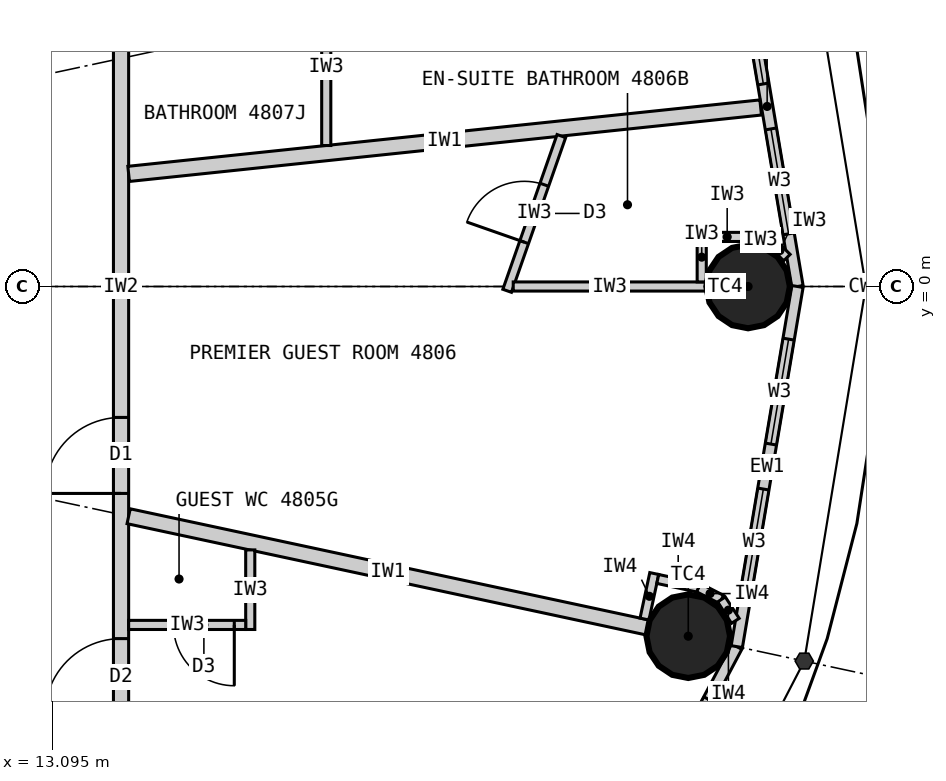
"""IFC4 building model, lengths in metres.
Left out: names, types, materials, properties, quantities, classifications, styles, units other than length and angle.
Written with IfcOpenShell. Run it as: python <this file> out.ifc"""

import sys

from ifc_helpers import new_model, si_unit, direction, frame, frame_2d, origin, origin_2d, place, context, subcontext, project, spatial, rectangle, circle, extrude, element, fill, save


model = new_model("IFC4")
c1 = context("Model", 3, precision=1e-05, world=origin(), true_north=direction((0.0, 1.0)))
c2 = subcontext(c1, "Body", "Model", "MODEL_VIEW")
j1 = project(units=[si_unit("LENGTHUNIT", "METRE"), si_unit("PLANEANGLEUNIT", "RADIAN")], contexts=[c1])
p1 = place(None, origin())
s1 = spatial("IfcSite", under=j1, at=p1, CompositionType="ELEMENT")
p2 = place(p1, origin())
s2 = spatial("IfcBuilding", under=s1, at=p2, CompositionType="ELEMENT")
p3 = place(p2, frame((0.0, 0.0, 179.7)))
s3 = spatial("IfcBuildingStorey", under=s2, at=p3, CompositionType="ELEMENT", Elevation=179.7)
for number, where, z_axis, x_axis in (
    (1, (22.25, 0.0, 0.0), (0.0, 0.0, 1.0), (1.0, 0.0, 0.0)),
    (2, (21.463, -4.601, 0.0), (0.0, 0.0, 1.0), (1.0, 0.0, 0.0)),
):
    element("IfcColumn", number, at=place(p3, frame(where, z_axis=z_axis, x_axis=x_axis)), inside=s3, PredefinedType="COLUMN", context=c2, shape_type="SweptSolid", body=[
        extrude(circle(Radius=0.55, at=origin_2d()), origin(), (0.0, 0.0, 1.0), 3.3),
    ])
p4 = place(p3, frame((22.9, 0.0, 0.0), z_axis=(0.0, 0.0, 1.0), x_axis=(-0.166162111254, 0.986098449843, 0.0)))
e3 = element("IfcWall", 3, at=p4, inside=s3, PredefinedType="ELEMENTEDWALL", context=c2, shape_type="SweptSolid", body=[
    extrude(rectangle(XDim=4.805, YDim=0.15, at=frame_2d((2.402, 0.0))), origin(), (0.0, 0.0, 1.0), 3.12),
])
p5 = place(p4, frame((0.702, 0.0, 0.9)))
e4 = element("IfcOpeningElement", 4, at=p5, cuts=e3, PredefinedType="OPENING", context=c2, shape_type="SweptSolid", body=[
    extrude(rectangle(XDim=1.4, YDim=1.9, at=frame_2d((0.7, 0.95))), frame((0.0, 0.085, 0.0), z_axis=(0.0, -1.0, 0.0), x_axis=(1.0, 0.0, 0.0)), (0.0, 0.0, 1.0), 0.17),
])
p6 = place(p4, frame((2.702, 0.0, 0.9)))
e5 = element("IfcOpeningElement", 5, at=p6, cuts=e3, PredefinedType="OPENING", context=c2, shape_type="SweptSolid", body=[
    extrude(rectangle(XDim=1.4, YDim=1.9, at=frame_2d((0.7, 0.95))), frame((0.0, 0.085, 0.0), z_axis=(0.0, -1.0, 0.0), x_axis=(1.0, 0.0, 0.0)), (0.0, 0.0, 1.0), 0.17),
])
p7 = place(p3, frame((19.772, -9.132, 0.0), z_axis=(0.0, 0.0, 1.0), x_axis=(0.468428906714, 0.883501193748, 0.0)))
e6 = element("IfcWall", 6, at=p7, inside=s3, PredefinedType="ELEMENTEDWALL", context=c2, shape_type="SweptSolid", body=[
    extrude(rectangle(XDim=4.974, YDim=0.15, at=frame_2d((2.487, 0.0))), origin(), (0.0, 0.0, 1.0), 3.12),
])
p8 = place(p7, frame((0.787, 0.0, 0.9)))
e7 = element("IfcOpeningElement", 7, at=p8, cuts=e6, PredefinedType="OPENING", context=c2, shape_type="SweptSolid", body=[
    extrude(rectangle(XDim=1.4, YDim=1.9, at=frame_2d((0.7, 0.95))), frame((0.0, 0.085, 0.0), z_axis=(0.0, -1.0, 0.0), x_axis=(1.0, 0.0, 0.0)), (0.0, 0.0, 1.0), 0.17),
])
p9 = place(p7, frame((2.787, 0.0, 0.9)))
e8 = element("IfcOpeningElement", 8, at=p9, cuts=e6, PredefinedType="OPENING", context=c2, shape_type="SweptSolid", body=[
    extrude(rectangle(XDim=1.4, YDim=1.9, at=frame_2d((0.7, 0.95))), frame((0.0, 0.085, 0.0), z_axis=(0.0, -1.0, 0.0), x_axis=(1.0, 0.0, 0.0)), (0.0, 0.0, 1.0), 0.17),
])
p10 = place(p3, frame((22.102, -4.738, 0.0), z_axis=(0.0, 0.0, 1.0), x_axis=(0.166162111254, 0.986098449843, 0.0)))
e9 = element("IfcWall", 9, at=p10, inside=s3, PredefinedType="ELEMENTEDWALL", context=c2, shape_type="SweptSolid", body=[
    extrude(rectangle(XDim=4.805, YDim=0.15, at=frame_2d((2.402, 0.0))), origin(), (0.0, 0.0, 1.0), 3.12),
])
p11 = place(p10, frame((0.702, 0.0, 0.9)))
e10 = element("IfcOpeningElement", 10, at=p11, cuts=e9, PredefinedType="OPENING", context=c2, shape_type="SweptSolid", body=[
    extrude(rectangle(XDim=1.4, YDim=1.9, at=frame_2d((0.7, 0.95))), frame((0.0, 0.085, 0.0), z_axis=(0.0, -1.0, 0.0), x_axis=(1.0, 0.0, 0.0)), (0.0, 0.0, 1.0), 0.17),
])
p12 = place(p10, frame((2.702, 0.0, 0.9)))
e11 = element("IfcOpeningElement", 11, at=p12, cuts=e9, PredefinedType="OPENING", context=c2, shape_type="SweptSolid", body=[
    extrude(rectangle(XDim=1.4, YDim=1.9, at=frame_2d((0.7, 0.95))), frame((0.0, 0.085, 0.0), z_axis=(0.0, -1.0, 0.0), x_axis=(1.0, 0.0, 0.0)), (0.0, 0.0, 1.0), 0.17),
])
p13 = place(p3, frame((14.0, -9.9, 0.0), z_axis=(0.0, 0.0, 1.0), x_axis=(0.0, 1.0, 0.0)))
e12 = element("IfcWall", 12, at=p13, inside=s3, PredefinedType="PARTITIONING", context=c2, shape_type="SweptSolid", body=[
    extrude(rectangle(XDim=19.8, YDim=0.2, at=frame_2d((9.9, 0.0))), origin(), (0.0, 0.0, 1.0), 3.12),
])
p14 = place(p13, frame((4.268, 0.0, 0.0)))
e13 = element("IfcOpeningElement", 13, at=p14, cuts=e12, PredefinedType="OPENING", context=c2, shape_type="SweptSolid", body=[
    extrude(rectangle(XDim=1.0, YDim=2.2, at=frame_2d((0.5, 1.1))), frame((0.0, 0.11, 0.0), z_axis=(0.0, -1.0, 0.0), x_axis=(1.0, 0.0, 0.0)), (0.0, 0.0, 1.0), 0.22),
])
p15 = place(p13, frame((7.177, 0.0, 0.0)))
e14 = element("IfcOpeningElement", 14, at=p15, cuts=e12, PredefinedType="OPENING", context=c2, shape_type="SweptSolid", body=[
    extrude(rectangle(XDim=1.0, YDim=2.2, at=frame_2d((0.5, 1.1))), frame((0.0, 0.11, 0.0), z_axis=(0.0, -1.0, 0.0), x_axis=(1.0, 0.0, 0.0)), (0.0, 0.0, 1.0), 0.22),
])
p16 = place(p13, frame((17.701, 0.0, 0.0)))
e15 = element("IfcOpeningElement", 15, at=p16, cuts=e12, PredefinedType="OPENING", context=c2, shape_type="SweptSolid", body=[
    extrude(rectangle(XDim=1.0, YDim=2.2, at=frame_2d((0.5, 1.1))), frame((0.0, 0.11, 0.0), z_axis=(0.0, -1.0, 0.0), x_axis=(1.0, 0.0, 0.0)), (0.0, 0.0, 1.0), 0.22),
])
p17 = place(p3, frame((14.1, 1.481, 0.0), z_axis=(0.0, 0.0, 1.0), x_axis=(0.994524794819, 0.104500873159, 0.0)))
e16 = element("IfcWall", 16, at=p17, inside=s3, PredefinedType="PARTITIONING", context=c2, shape_type="SweptSolid", body=[
    extrude(rectangle(XDim=8.362, YDim=0.2, at=frame_2d((4.181, 0.0))), origin(), (0.0, 0.0, 1.0), 2.37),
])
p18 = place(p3, frame((14.1, -3.022, 0.0), z_axis=(0.0, 0.0, 1.0), x_axis=(0.977790639684, -0.209584028367, 0.0)))
e17 = element("IfcWall", 17, at=p18, inside=s3, PredefinedType="PARTITIONING", context=c2, shape_type="SweptSolid", body=[
    extrude(rectangle(XDim=6.98, YDim=0.2, at=frame_2d((3.49, 0.0))), origin(), (0.0, 0.0, 1.0), 2.27),
])
p19 = place(p3, frame((15.7, -3.465, 0.0), z_axis=(0.0, 0.0, 1.0), x_axis=(0.0, -1.0, 0.0)))
e18 = element("IfcWall", 18, at=p19, inside=s3, PredefinedType="PARTITIONING", context=c2, shape_type="SweptSolid", body=[
    extrude(rectangle(XDim=1.047, YDim=0.12, at=frame_2d((0.523, 0.0))), origin(), (0.0, 0.0, 1.0), 3.12),
])
p20 = place(p3, frame((14.1, -4.452, 0.0), z_axis=(0.0, 0.0, 1.0), x_axis=(1.0, 0.0, 0.0)))
e19 = element("IfcWall", 19, at=p20, inside=s3, PredefinedType="PARTITIONING", context=c2, shape_type="SweptSolid", body=[
    extrude(rectangle(XDim=1.54, YDim=0.12, at=frame_2d((0.77, 0.0))), origin(), (0.0, 0.0, 1.0), 3.12),
])
p21 = place(p20, frame((0.59, 0.0, 0.0)))
e20 = element("IfcOpeningElement", 20, at=p21, cuts=e19, PredefinedType="OPENING", context=c2, shape_type="SweptSolid", body=[
    extrude(rectangle(XDim=0.8, YDim=2.1, at=frame_2d((0.4, 1.05))), frame((0.0, 0.07, 0.0), z_axis=(0.0, -1.0, 0.0), x_axis=(1.0, 0.0, 0.0)), (0.0, 0.0, 1.0), 0.14),
])
p22 = place(p3, frame((19.793, 1.979, 0.0), z_axis=(0.0, 0.0, 1.0), x_axis=(-0.330587353123, -0.943775398045, 0.0)))
e21 = element("IfcWall", 21, at=p22, inside=s3, PredefinedType="PARTITIONING", context=c2, shape_type="SweptSolid", body=[
    extrude(rectangle(XDim=2.157, YDim=0.12, at=frame_2d((1.079, 0.0))), origin(), (0.0, 0.0, 1.0), 3.12),
])
p23 = place(p22, frame((0.678, 0.0, 0.0)))
e22 = element("IfcOpeningElement", 22, at=p23, cuts=e21, PredefinedType="OPENING", context=c2, shape_type="SweptSolid", body=[
    extrude(rectangle(XDim=0.8, YDim=2.1, at=frame_2d((0.4, 1.05))), frame((0.0, 0.07, 0.0), z_axis=(0.0, -1.0, 0.0), x_axis=(1.0, 0.0, 0.0)), (0.0, 0.0, 1.0), 0.14),
])
p24 = place(p3, frame((19.16, 0.0, 0.0), z_axis=(0.0, 0.0, 1.0), x_axis=(1.0, 0.0, 0.0)))
e23 = element("IfcWall", 23, at=p24, inside=s3, PredefinedType="PARTITIONING", context=c2, shape_type="SweptSolid", body=[
    extrude(rectangle(XDim=2.54, YDim=0.12, at=frame_2d((1.27, 0.0))), origin(), (0.0, 0.0, 1.0), 2.27),
])
p25 = place(p3, frame((21.64, 0.06, 0.0), z_axis=(0.0, 0.0, 1.0), x_axis=(0.0, 1.0, 0.0)))
e24 = element("IfcWall", 24, at=p25, inside=s3, PredefinedType="PARTITIONING", context=c2, shape_type="SweptSolid", body=[
    extrude(rectangle(XDim=0.652, YDim=0.12, at=frame_2d((0.326, 0.0))), origin(), (0.0, 0.0, 1.0), 3.12),
])
p26 = place(p3, frame((21.7, 0.652, 0.0), z_axis=(0.0, 0.0, 1.0), x_axis=(1.0, 0.0, 0.0)))
e25 = element("IfcWall", 25, at=p26, inside=s3, PredefinedType="PARTITIONING", context=c2, shape_type="SweptSolid", body=[
    extrude(rectangle(XDim=0.55, YDim=0.12, at=frame_2d((0.275, 0.0))), origin(), (0.0, 0.0, 1.0), 3.12),
])
p27 = place(p3, frame((22.25, 0.652, 0.0), z_axis=(0.0, 0.0, 1.0), x_axis=(0.965922233104, -0.258832454679, 0.0)))
e26 = element("IfcWall", 26, at=p27, inside=s3, PredefinedType="PARTITIONING", context=c2, shape_type="SweptSolid", body=[
    extrude(rectangle(XDim=0.338, YDim=0.12, at=frame_2d((0.169, 0.0))), origin(), (0.0, 0.0, 1.0), 3.12),
])
p28 = place(p3, frame((22.576, 0.565, 0.0), z_axis=(0.0, 0.0, 1.0), x_axis=(0.706639272724, -0.707573980757, 0.0)))
e27 = element("IfcWall", 27, at=p28, inside=s3, PredefinedType="PARTITIONING", context=c2, shape_type="SweptSolid", body=[
    extrude(rectangle(XDim=0.261, YDim=0.12, at=frame_2d((0.131, 0.0))), origin(), (0.0, 0.0, 1.0), 3.12),
])
p29 = place(p3, frame((16.7, 1.855, 0.0), z_axis=(0.0, 0.0, 1.0), x_axis=(0.0, 1.0, 0.0)))
e28 = element("IfcWall", 28, at=p29, inside=s3, PredefinedType="PARTITIONING", context=c2, shape_type="SweptSolid", body=[
    extrude(rectangle(XDim=2.067, YDim=0.12, at=frame_2d((1.033, 0.0))), origin(), (0.0, 0.0, 1.0), 3.12),
])
p30 = place(p3, frame((20.887, -4.375, 0.0), z_axis=(0.0, 0.0, 1.0), x_axis=(0.209746941802, 0.977755705892, 0.0)))
e29 = element("IfcWall", 29, at=p30, inside=s3, PredefinedType="PARTITIONING", context=c2, shape_type="SweptSolid", body=[
    extrude(rectangle(XDim=0.612, YDim=0.12, at=frame_2d((0.306, 0.0))), origin(), (0.0, 0.0, 1.0), 3.12),
])
p31 = place(p3, frame((21.062, -3.848, 0.0), z_axis=(0.0, 0.0, 1.0), x_axis=(0.977789415726, -0.209589738521, 0.0)))
e30 = element("IfcWall", 30, at=p31, inside=s3, PredefinedType="PARTITIONING", context=c2, shape_type="SweptSolid", body=[
    extrude(rectangle(XDim=0.55, YDim=0.12, at=frame_2d((0.275, 0.0))), origin(), (0.0, 0.0, 1.0), 3.12),
])
p32 = place(p3, frame((21.599, -3.963, 0.0), z_axis=(0.0, 0.0, 1.0), x_axis=(0.890193602875, -0.455582428766, 0.0)))
e31 = element("IfcWall", 31, at=p32, inside=s3, PredefinedType="PARTITIONING", context=c2, shape_type="SweptSolid", body=[
    extrude(rectangle(XDim=0.338, YDim=0.12, at=frame_2d((0.169, 0.0))), origin(), (0.0, 0.0, 1.0), 3.12),
])
p33 = place(p3, frame((21.9, -4.117, 0.0), z_axis=(0.0, 0.0, 1.0), x_axis=(0.543582688681, -0.839355622228, 0.0)))
e32 = element("IfcWall", 32, at=p33, inside=s3, PredefinedType="PARTITIONING", context=c2, shape_type="SweptSolid", body=[
    extrude(rectangle(XDim=0.336, YDim=0.12, at=frame_2d((0.168, 0.0))), origin(), (0.0, 0.0, 1.0), 3.12),
])
p34 = place(p5, origin())
e33 = element("IfcWindow", 33, at=p34, inside=s3, PartitioningType="SINGLE_PANEL", PredefinedType="WINDOW", context=c2, shape_type="SweptSolid", body=[
    extrude(rectangle(XDim=1.4, YDim=1.9, at=frame_2d((0.7, 0.95))), frame((0.0, 0.03, 0.0), z_axis=(0.0, -1.0, 0.0), x_axis=(1.0, 0.0, 0.0)), (0.0, 0.0, 1.0), 0.06),
])
fill(e4, e33)
p35 = place(p6, origin())
e34 = element("IfcWindow", 34, at=p35, inside=s3, PartitioningType="SINGLE_PANEL", PredefinedType="WINDOW", context=c2, shape_type="SweptSolid", body=[
    extrude(rectangle(XDim=1.4, YDim=1.9, at=frame_2d((0.7, 0.95))), frame((0.0, 0.03, 0.0), z_axis=(0.0, -1.0, 0.0), x_axis=(1.0, 0.0, 0.0)), (0.0, 0.0, 1.0), 0.06),
])
fill(e5, e34)
p36 = place(p9, origin())
e35 = element("IfcWindow", 35, at=p36, inside=s3, PartitioningType="SINGLE_PANEL", PredefinedType="WINDOW", context=c2, shape_type="SweptSolid", body=[
    extrude(rectangle(XDim=1.4, YDim=1.9, at=frame_2d((0.7, 0.95))), frame((0.0, 0.03, 0.0), z_axis=(0.0, -1.0, 0.0), x_axis=(1.0, 0.0, 0.0)), (0.0, 0.0, 1.0), 0.06),
])
fill(e8, e35)
p37 = place(p11, origin())
e36 = element("IfcWindow", 36, at=p37, inside=s3, PartitioningType="SINGLE_PANEL", PredefinedType="WINDOW", context=c2, shape_type="SweptSolid", body=[
    extrude(rectangle(XDim=1.4, YDim=1.9, at=frame_2d((0.7, 0.95))), frame((0.0, 0.03, 0.0), z_axis=(0.0, -1.0, 0.0), x_axis=(1.0, 0.0, 0.0)), (0.0, 0.0, 1.0), 0.06),
])
fill(e10, e36)
p38 = place(p12, origin())
e37 = element("IfcWindow", 37, at=p38, inside=s3, PartitioningType="SINGLE_PANEL", PredefinedType="WINDOW", context=c2, shape_type="SweptSolid", body=[
    extrude(rectangle(XDim=1.4, YDim=1.9, at=frame_2d((0.7, 0.95))), frame((0.0, 0.03, 0.0), z_axis=(0.0, -1.0, 0.0), x_axis=(1.0, 0.0, 0.0)), (0.0, 0.0, 1.0), 0.06),
])
fill(e11, e37)
p39 = place(p21, origin())
e38 = element("IfcDoor", 38, at=p39, inside=s3, OperationType="SINGLE_SWING_RIGHT", PredefinedType="DOOR", context=c2, shape_type="SweptSolid", body=[
    extrude(rectangle(XDim=0.8, YDim=2.1, at=frame_2d((0.4, 1.05))), frame((0.0, 0.025, 0.0), z_axis=(0.0, -1.0, 0.0), x_axis=(1.0, 0.0, 0.0)), (0.0, 0.0, 1.0), 0.05),
])
fill(e20, e38)
p40 = place(p14, origin())
e39 = element("IfcDoor", 39, at=p40, inside=s3, OperationType="SINGLE_SWING_LEFT", PredefinedType="DOOR", context=c2, shape_type="SweptSolid", body=[
    extrude(rectangle(XDim=1.0, YDim=2.2, at=frame_2d((0.5, 1.1))), frame((0.0, 0.025, 0.0), z_axis=(0.0, -1.0, 0.0), x_axis=(1.0, 0.0, 0.0)), (0.0, 0.0, 1.0), 0.05),
])
fill(e13, e39)
p41 = place(p23, origin())
e40 = element("IfcDoor", 40, at=p41, inside=s3, OperationType="SINGLE_SWING_RIGHT", PredefinedType="DOOR", context=c2, shape_type="SweptSolid", body=[
    extrude(rectangle(XDim=0.8, YDim=2.1, at=frame_2d((0.4, 1.05))), frame((0.0, 0.025, 0.0), z_axis=(0.0, -1.0, 0.0), x_axis=(1.0, 0.0, 0.0)), (0.0, 0.0, 1.0), 0.05),
])
fill(e22, e40)
p42 = place(p15, origin())
e41 = element("IfcDoor", 41, at=p42, inside=s3, OperationType="SINGLE_SWING_LEFT", PredefinedType="DOOR", context=c2, shape_type="SweptSolid", body=[
    extrude(rectangle(XDim=1.0, YDim=2.2, at=frame_2d((0.5, 1.1))), frame((0.0, 0.025, 0.0), z_axis=(0.0, -1.0, 0.0), x_axis=(1.0, 0.0, 0.0)), (0.0, 0.0, 1.0), 0.05),
])
fill(e14, e41)
save(model, sys.argv[1])
